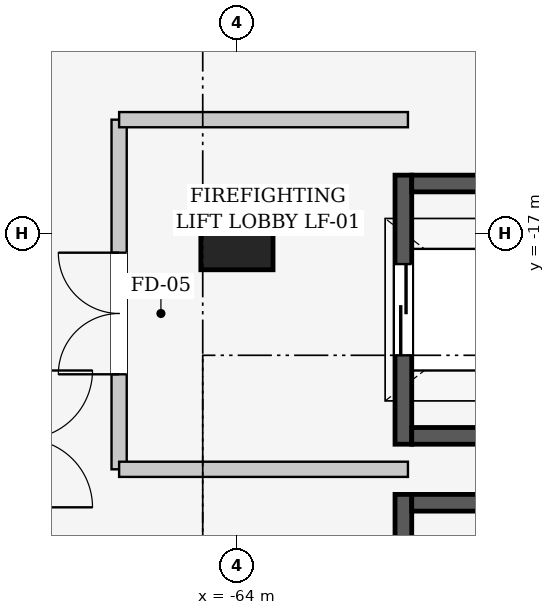
"""IFC4 building model, lengths in metres.
Left out: names, types, materials, properties, quantities, classifications, styles, units other than length and angle.
Written with IfcOpenShell. Run it as: python <this file> out.ifc"""

import sys

from ifc_helpers import new_model, si_unit, direction, frame, frame_2d, origin, origin_2d, place, context, subcontext, project, spatial, rectangle, extrude, element, fill, save


model = new_model("IFC4")
c1 = context("Model", 3, precision=1e-05, world=origin(), true_north=direction((0.0, 1.0)))
c2 = subcontext(c1, "Body", "Model", "MODEL_VIEW")
j1 = project(units=[si_unit("LENGTHUNIT", "METRE"), si_unit("PLANEANGLEUNIT", "RADIAN")], contexts=[c1])
p1 = place(None, origin())
s1 = spatial("IfcSite", under=j1, at=p1, CompositionType="ELEMENT")
p2 = place(p1, origin())
s2 = spatial("IfcBuilding", under=s1, at=p2, CompositionType="ELEMENT")
p3 = place(p2, origin())
s3 = spatial("IfcBuildingStorey", under=s2, at=p3, CompositionType="ELEMENT", Elevation=0.0)
p4 = place(p3, frame((-64.0, -17.0, 0.0), z_axis=(0.0, 0.0, 1.0), x_axis=(1.0, 0.0, 0.0)))
e1 = element("IfcColumn", 1, at=p4, inside=s3, PredefinedType="COLUMN", context=c2, shape_type="SweptSolid", body=[
    extrude(rectangle(XDim=0.95, YDim=0.95, at=origin_2d()), origin(), (0.0, 0.0, 1.0), 6.0),
])
p5 = place(p3, frame((-61.81, -19.77, 0.0), z_axis=(0.0, 0.0, 1.0), x_axis=(0.0, 1.0, 0.0)))
e2 = element("IfcWall", 2, at=p5, inside=s3, PredefinedType="SHEAR", context=c2, shape_type="SweptSolid", body=[
    extrude(rectangle(XDim=3.54, YDim=0.22, at=frame_2d((1.77, 0.0))), origin(), (0.0, 0.0, 1.0), 6.0),
])
p6 = place(p5, frame((1.17, 0.0, 0.0)))
e3 = element("IfcOpeningElement", 3, at=p6, cuts=e2, PredefinedType="OPENING", context=c2, shape_type="SweptSolid", body=[
    extrude(rectangle(XDim=1.2, YDim=2.2, at=frame_2d((0.6, 1.1))), frame((0.0, 0.12, 0.0), z_axis=(0.0, -1.0, 0.0), x_axis=(1.0, 0.0, 0.0)), (0.0, 0.0, 1.0), 0.24),
])
for number, where, z_axis, x_axis in (
    (4, (-61.7, -16.34, 0.0), (0.0, 0.0, 1.0), (1.0, 0.0, 0.0)),
    (5, (-59.3, -19.66, 0.0), (0.0, 0.0, 1.0), (-1.0, 0.0, 0.0)),
):
    element("IfcWall", number, at=place(p3, frame(where, z_axis=z_axis, x_axis=x_axis)), inside=s3, PredefinedType="SHEAR", context=c2, shape_type="SweptSolid", body=[
        extrude(rectangle(XDim=2.4, YDim=0.22, at=frame_2d((1.2, 0.0))), origin(), (0.0, 0.0, 1.0), 6.0),
    ])
p7 = place(p3, frame((-61.81, -23.97, 0.0), z_axis=(0.0, 0.0, 1.0), x_axis=(0.0, 1.0, 0.0)))
e6 = element("IfcWall", 6, at=p7, inside=s3, PredefinedType="SHEAR", context=c2, shape_type="SweptSolid", body=[
    extrude(rectangle(XDim=3.54, YDim=0.22, at=frame_2d((1.77, 0.0))), origin(), (0.0, 0.0, 1.0), 6.0),
])
p8 = place(p7, frame((1.22, 0.0, 0.0)))
e7 = element("IfcOpeningElement", 7, at=p8, cuts=e6, PredefinedType="OPENING", context=c2, shape_type="SweptSolid", body=[
    extrude(rectangle(XDim=1.1, YDim=2.2, at=frame_2d((0.55, 1.1))), frame((0.0, 0.12, 0.0), z_axis=(0.0, -1.0, 0.0), x_axis=(1.0, 0.0, 0.0)), (0.0, 0.0, 1.0), 0.24),
])
p9 = place(p3, frame((-61.7, -20.54, 0.0), z_axis=(0.0, 0.0, 1.0), x_axis=(1.0, 0.0, 0.0)))
e8 = element("IfcWall", 8, at=p9, inside=s3, PredefinedType="SHEAR", context=c2, shape_type="SweptSolid", body=[
    extrude(rectangle(XDim=2.4, YDim=0.22, at=frame_2d((1.2, 0.0))), origin(), (0.0, 0.0, 1.0), 6.0),
])
p10 = place(p3, frame((-65.55, -20.1, 0.0), z_axis=(0.0, 0.0, 1.0), x_axis=(0.0, 1.0, 0.0)))
e9 = element("IfcWall", 9, at=p10, inside=s3, PredefinedType="PARTITIONING", context=c2, shape_type="SweptSolid", body=[
    extrude(rectangle(XDim=4.6, YDim=0.2, at=frame_2d((2.3, 0.0))), origin(), (0.0, 0.0, 1.0), 4.725),
])
p11 = place(p10, frame((1.25, 0.0, 0.0)))
e10 = element("IfcOpeningElement", 10, at=p11, cuts=e9, PredefinedType="OPENING", context=c2, shape_type="SweptSolid", body=[
    extrude(rectangle(XDim=1.6, YDim=2.2, at=frame_2d((0.8, 1.1))), frame((0.0, 0.11, 0.0), z_axis=(0.0, -1.0, 0.0), x_axis=(1.0, 0.0, 0.0)), (0.0, 0.0, 1.0), 0.22),
])
for number, where, z_axis, x_axis in (
    (11, (-65.55, -15.5, 0.0), (0.0, 0.0, 1.0), (1.0, 0.0, 0.0)),
    (12, (-61.75, -20.1, 0.0), (0.0, 0.0, 1.0), (-1.0, 0.0, 0.0)),
):
    element("IfcWall", number, at=place(p3, frame(where, z_axis=z_axis, x_axis=x_axis)), inside=s3, PredefinedType="PARTITIONING", context=c2, shape_type="SweptSolid", body=[
        extrude(rectangle(XDim=3.8, YDim=0.2, at=frame_2d((1.9, 0.0))), origin(), (0.0, 0.0, 1.0), 5.025),
    ])
p12 = place(p6, origin())
e13 = element("IfcDoor", 13, at=p12, inside=s3, OperationType="SLIDING_TO_LEFT", PredefinedType="DOOR", context=c2, shape_type="SweptSolid", body=[
    extrude(rectangle(XDim=1.2, YDim=2.2, at=frame_2d((0.6, 1.1))), frame((0.0, 0.025, 0.0), z_axis=(0.0, -1.0, 0.0), x_axis=(1.0, 0.0, 0.0)), (0.0, 0.0, 1.0), 0.05),
])
fill(e3, e13)
p13 = place(p11, origin())
e14 = element("IfcDoor", 14, at=p13, inside=s3, OperationType="DOUBLE_DOOR_SINGLE_SWING", PredefinedType="DOOR", context=c2, shape_type="SweptSolid", body=[
    extrude(rectangle(XDim=1.6, YDim=2.2, at=frame_2d((0.8, 1.1))), frame((0.0, 0.025, 0.0), z_axis=(0.0, -1.0, 0.0), x_axis=(1.0, 0.0, 0.0)), (0.0, 0.0, 1.0), 0.05),
])
fill(e10, e14)
save(model, sys.argv[1])
